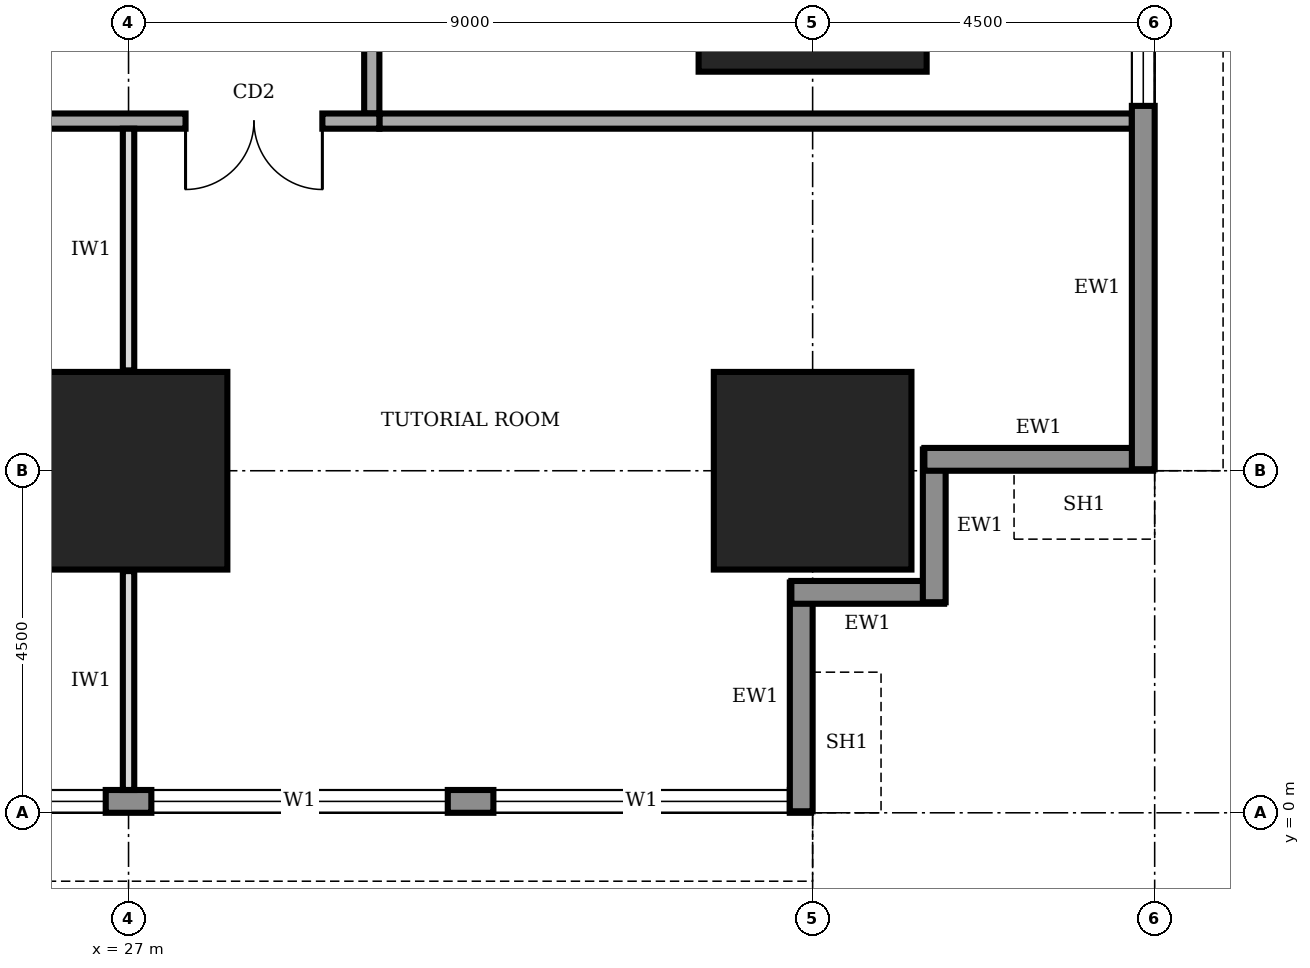
"""IFC4 building model, lengths in metres.
Left out: names, types, materials, properties, quantities, classifications, styles, units other than length and angle.
Written with IfcOpenShell. Run it as: python <this file> out.ifc"""

import sys

from ifc_helpers import new_model, si_unit, direction, frame, frame_2d, origin, origin_2d, place, context, subcontext, project, spatial, rectangle, extrude, element, fill, save


model = new_model("IFC4")
c1 = context("Model", 3, precision=1e-05, world=origin(), true_north=direction((0.0, 1.0)))
c2 = subcontext(c1, "Body", "Model", "MODEL_VIEW")
j1 = project(units=[si_unit("LENGTHUNIT", "METRE"), si_unit("PLANEANGLEUNIT", "RADIAN")], contexts=[c1])
p1 = place(None, origin())
s1 = spatial("IfcSite", under=j1, at=p1, CompositionType="ELEMENT")
p2 = place(p1, origin())
s2 = spatial("IfcBuilding", under=s1, at=p2, CompositionType="ELEMENT")
p3 = place(p2, frame((0.0, 0.0, 45.0)))
s3 = spatial("IfcBuildingStorey", under=s2, at=p3, CompositionType="ELEMENT", Elevation=45.0)
for number, where, z_axis, x_axis in (
    (1, (27.0, 4.5, 0.0), (0.0, 0.0, 1.0), (1.0, 0.0, 0.0)),
    (2, (36.0, 4.5, 0.0), (0.0, 0.0, 1.0), (1.0, 0.0, 0.0)),
):
    element("IfcColumn", number, at=place(p3, frame(where, z_axis=z_axis, x_axis=x_axis)), inside=s3, PredefinedType="COLUMN", context=c2, shape_type="SweptSolid", body=[
        extrude(rectangle(XDim=2.6, YDim=2.6, at=origin_2d()), origin(), (0.0, 0.0, 1.0), 4.0),
    ])
p4 = place(p3, frame((36.0, 11.25, 0.0), z_axis=(0.0, 0.0, 1.0), x_axis=(1.0, 0.0, 0.0)))
e3 = element("IfcColumn", 3, at=p4, inside=s3, PredefinedType="COLUMN", context=c2, shape_type="SweptSolid", body=[
    extrude(rectangle(XDim=3.0, YDim=3.0, at=origin_2d()), origin(), (0.0, 0.0, 1.0), 4.0),
])
p5 = place(p3, frame((4.52, 0.15, 0.0), z_axis=(0.0, 0.0, 1.0), x_axis=(1.0, 0.0, 0.0)))
e4 = element("IfcWall", 4, at=p5, inside=s3, PredefinedType="STANDARD", context=c2, shape_type="SweptSolid", body=[
    extrude(rectangle(XDim=31.46, YDim=0.3, at=frame_2d((15.73, 0.0))), origin(), (0.0, 0.0, 1.0), 3.75),
])
p6 = place(p5, frame((4.78, 0.0, 0.9)))
e5 = element("IfcOpeningElement", 5, at=p6, cuts=e4, PredefinedType="OPENING", context=c2, shape_type="SweptSolid", body=[
    extrude(rectangle(XDim=3.9, YDim=2.2, at=frame_2d((1.95, 1.1))), frame((0.0, 0.16, 0.0), z_axis=(0.0, -1.0, 0.0), x_axis=(1.0, 0.0, 0.0)), (0.0, 0.0, 1.0), 0.32),
])
p7 = place(p5, frame((9.28, 0.0, 0.9)))
e6 = element("IfcOpeningElement", 6, at=p7, cuts=e4, PredefinedType="OPENING", context=c2, shape_type="SweptSolid", body=[
    extrude(rectangle(XDim=3.9, YDim=2.2, at=frame_2d((1.95, 1.1))), frame((0.0, 0.16, 0.0), z_axis=(0.0, -1.0, 0.0), x_axis=(1.0, 0.0, 0.0)), (0.0, 0.0, 1.0), 0.32),
])
p8 = place(p5, frame((13.78, 0.0, 0.9)))
e7 = element("IfcOpeningElement", 7, at=p8, cuts=e4, PredefinedType="OPENING", context=c2, shape_type="SweptSolid", body=[
    extrude(rectangle(XDim=3.9, YDim=2.2, at=frame_2d((1.95, 1.1))), frame((0.0, 0.16, 0.0), z_axis=(0.0, -1.0, 0.0), x_axis=(1.0, 0.0, 0.0)), (0.0, 0.0, 1.0), 0.32),
])
p9 = place(p5, frame((18.28, 0.0, 0.9)))
e8 = element("IfcOpeningElement", 8, at=p9, cuts=e4, PredefinedType="OPENING", context=c2, shape_type="SweptSolid", body=[
    extrude(rectangle(XDim=3.9, YDim=2.2, at=frame_2d((1.95, 1.1))), frame((0.0, 0.16, 0.0), z_axis=(0.0, -1.0, 0.0), x_axis=(1.0, 0.0, 0.0)), (0.0, 0.0, 1.0), 0.32),
])
p10 = place(p5, frame((22.78, 0.0, 0.9)))
e9 = element("IfcOpeningElement", 9, at=p10, cuts=e4, PredefinedType="OPENING", context=c2, shape_type="SweptSolid", body=[
    extrude(rectangle(XDim=3.9, YDim=2.2, at=frame_2d((1.95, 1.1))), frame((0.0, 0.16, 0.0), z_axis=(0.0, -1.0, 0.0), x_axis=(1.0, 0.0, 0.0)), (0.0, 0.0, 1.0), 0.32),
])
p11 = place(p5, frame((27.28, 0.0, 0.9)))
e10 = element("IfcOpeningElement", 10, at=p11, cuts=e4, PredefinedType="OPENING", context=c2, shape_type="SweptSolid", body=[
    extrude(rectangle(XDim=3.9, YDim=2.2, at=frame_2d((1.95, 1.1))), frame((0.0, 0.16, 0.0), z_axis=(0.0, -1.0, 0.0), x_axis=(1.0, 0.0, 0.0)), (0.0, 0.0, 1.0), 0.32),
])
p12 = place(p3, frame((35.85, 0.02, 0.0), z_axis=(0.0, 0.0, 1.0), x_axis=(0.0, 1.0, 0.0)))
e11 = element("IfcWall", 11, at=p12, inside=s3, PredefinedType="STANDARD", context=c2, shape_type="SweptSolid", body=[
    extrude(rectangle(XDim=3.01, YDim=0.3, at=frame_2d((1.505, 0.0))), origin(), (0.0, 0.0, 1.0), 2.85),
])
for number, where, z_axis, x_axis in (
    (12, (35.72, 2.9, 0.0), (0.0, 0.0, 1.0), (1.0, 0.0, 0.0)),
    (13, (37.6, 2.77, 0.0), (0.0, 0.0, 1.0), (0.0, 1.0, 0.0)),
):
    element("IfcWall", number, at=place(p3, frame(where, z_axis=z_axis, x_axis=x_axis)), inside=s3, PredefinedType="STANDARD", context=c2, shape_type="SweptSolid", body=[
        extrude(rectangle(XDim=2.01, YDim=0.3, at=frame_2d((1.005, 0.0))), origin(), (0.0, 0.0, 1.0), 3.75),
    ])
p13 = place(p3, frame((37.47, 4.65, 0.0), z_axis=(0.0, 0.0, 1.0), x_axis=(1.0, 0.0, 0.0)))
e14 = element("IfcWall", 14, at=p13, inside=s3, PredefinedType="STANDARD", context=c2, shape_type="SweptSolid", body=[
    extrude(rectangle(XDim=3.01, YDim=0.3, at=frame_2d((1.505, 0.0))), origin(), (0.0, 0.0, 1.0), 2.85),
])
p14 = place(p3, frame((40.35, 4.52, 0.0), z_axis=(0.0, 0.0, 1.0), x_axis=(0.0, 1.0, 0.0)))
e15 = element("IfcWall", 15, at=p14, inside=s3, PredefinedType="STANDARD", context=c2, shape_type="SweptSolid", body=[
    extrude(rectangle(XDim=31.46, YDim=0.3, at=frame_2d((15.73, 0.0))), origin(), (0.0, 0.0, 1.0), 3.75),
])
p15 = place(p14, frame((4.78, 0.0, 0.9)))
e16 = element("IfcOpeningElement", 16, at=p15, cuts=e15, PredefinedType="OPENING", context=c2, shape_type="SweptSolid", body=[
    extrude(rectangle(XDim=3.9, YDim=2.2, at=frame_2d((1.95, 1.1))), frame((0.0, 0.16, 0.0), z_axis=(0.0, -1.0, 0.0), x_axis=(1.0, 0.0, 0.0)), (0.0, 0.0, 1.0), 0.32),
])
p16 = place(p14, frame((9.28, 0.0, 0.9)))
e17 = element("IfcOpeningElement", 17, at=p16, cuts=e15, PredefinedType="OPENING", context=c2, shape_type="SweptSolid", body=[
    extrude(rectangle(XDim=3.9, YDim=2.2, at=frame_2d((1.95, 1.1))), frame((0.0, 0.16, 0.0), z_axis=(0.0, -1.0, 0.0), x_axis=(1.0, 0.0, 0.0)), (0.0, 0.0, 1.0), 0.32),
])
p17 = place(p14, frame((13.78, 0.0, 0.9)))
e18 = element("IfcOpeningElement", 18, at=p17, cuts=e15, PredefinedType="OPENING", context=c2, shape_type="SweptSolid", body=[
    extrude(rectangle(XDim=3.9, YDim=2.2, at=frame_2d((1.95, 1.1))), frame((0.0, 0.16, 0.0), z_axis=(0.0, -1.0, 0.0), x_axis=(1.0, 0.0, 0.0)), (0.0, 0.0, 1.0), 0.32),
])
p18 = place(p14, frame((18.28, 0.0, 0.9)))
e19 = element("IfcOpeningElement", 19, at=p18, cuts=e15, PredefinedType="OPENING", context=c2, shape_type="SweptSolid", body=[
    extrude(rectangle(XDim=3.9, YDim=2.2, at=frame_2d((1.95, 1.1))), frame((0.0, 0.16, 0.0), z_axis=(0.0, -1.0, 0.0), x_axis=(1.0, 0.0, 0.0)), (0.0, 0.0, 1.0), 0.32),
])
p19 = place(p14, frame((22.78, 0.0, 0.9)))
e20 = element("IfcOpeningElement", 20, at=p19, cuts=e15, PredefinedType="OPENING", context=c2, shape_type="SweptSolid", body=[
    extrude(rectangle(XDim=3.9, YDim=2.2, at=frame_2d((1.95, 1.1))), frame((0.0, 0.16, 0.0), z_axis=(0.0, -1.0, 0.0), x_axis=(1.0, 0.0, 0.0)), (0.0, 0.0, 1.0), 0.32),
])
p20 = place(p14, frame((27.28, 0.0, 0.9)))
e21 = element("IfcOpeningElement", 21, at=p20, cuts=e15, PredefinedType="OPENING", context=c2, shape_type="SweptSolid", body=[
    extrude(rectangle(XDim=3.9, YDim=2.2, at=frame_2d((1.95, 1.1))), frame((0.0, 0.16, 0.0), z_axis=(0.0, -1.0, 0.0), x_axis=(1.0, 0.0, 0.0)), (0.0, 0.0, 1.0), 0.32),
])
p21 = place(p3, frame((11.9, 9.1, 0.0), z_axis=(0.0, 0.0, 1.0), x_axis=(1.0, 0.0, 0.0)))
e22 = element("IfcWall", 22, at=p21, inside=s3, PredefinedType="SOLIDWALL", context=c2, shape_type="SweptSolid", body=[
    extrude(rectangle(XDim=18.4, YDim=0.2, at=frame_2d((9.2, 0.0))), origin(), (0.0, 0.0, 1.0), 3.75),
])
p22 = place(p21, frame((0.275, 0.0, 0.0)))
e23 = element("IfcOpeningElement", 23, at=p22, cuts=e22, PredefinedType="OPENING", context=c2, shape_type="SweptSolid", body=[
    extrude(rectangle(XDim=1.0, YDim=2.1, at=frame_2d((0.5, 1.05))), frame((0.0, 0.11, 0.0), z_axis=(0.0, -1.0, 0.0), x_axis=(1.0, 0.0, 0.0)), (0.0, 0.0, 1.0), 0.22),
])
p23 = place(p21, frame((3.35, 0.0, 0.0)))
e24 = element("IfcOpeningElement", 24, at=p23, cuts=e22, PredefinedType="OPENING", context=c2, shape_type="SweptSolid", body=[
    extrude(rectangle(XDim=1.0, YDim=2.1, at=frame_2d((0.5, 1.05))), frame((0.0, 0.11, 0.0), z_axis=(0.0, -1.0, 0.0), x_axis=(1.0, 0.0, 0.0)), (0.0, 0.0, 1.0), 0.22),
])
p24 = place(p21, frame((10.1, 0.0, 0.0)))
e25 = element("IfcOpeningElement", 25, at=p24, cuts=e22, PredefinedType="OPENING", context=c2, shape_type="SweptSolid", body=[
    extrude(rectangle(XDim=1.0, YDim=2.1, at=frame_2d((0.5, 1.05))), frame((0.0, 0.11, 0.0), z_axis=(0.0, -1.0, 0.0), x_axis=(1.0, 0.0, 0.0)), (0.0, 0.0, 1.0), 0.22),
])
p25 = place(p21, frame((15.85, 0.0, 0.0)))
e26 = element("IfcOpeningElement", 26, at=p25, cuts=e22, PredefinedType="OPENING", context=c2, shape_type="SweptSolid", body=[
    extrude(rectangle(XDim=1.8, YDim=2.1, at=frame_2d((0.9, 1.05))), frame((0.0, 0.11, 0.0), z_axis=(0.0, -1.0, 0.0), x_axis=(1.0, 0.0, 0.0)), (0.0, 0.0, 1.0), 0.22),
])
p26 = place(p3, frame((30.2, 9.2, 0.0), z_axis=(0.0, 0.0, 1.0), x_axis=(0.0, 1.0, 0.0)))
e27 = element("IfcWall", 27, at=p26, inside=s3, PredefinedType="SOLIDWALL", context=c2, shape_type="SweptSolid", body=[
    extrude(rectangle(XDim=22.3, YDim=0.2, at=frame_2d((11.15, 0.0))), origin(), (0.0, 0.0, 1.0), 3.75),
])
p27 = place(p26, frame((1.55, 0.0, 0.0)))
e28 = element("IfcOpeningElement", 28, at=p27, cuts=e27, PredefinedType="OPENING", context=c2, shape_type="SweptSolid", body=[
    extrude(rectangle(XDim=1.0, YDim=2.1, at=frame_2d((0.5, 1.05))), frame((0.0, 0.11, 0.0), z_axis=(0.0, -1.0, 0.0), x_axis=(1.0, 0.0, 0.0)), (0.0, 0.0, 1.0), 0.22),
])
p28 = place(p26, frame((8.3, 0.0, 0.0)))
e29 = element("IfcOpeningElement", 29, at=p28, cuts=e27, PredefinedType="OPENING", context=c2, shape_type="SweptSolid", body=[
    extrude(rectangle(XDim=1.0, YDim=2.1, at=frame_2d((0.5, 1.05))), frame((0.0, 0.11, 0.0), z_axis=(0.0, -1.0, 0.0), x_axis=(1.0, 0.0, 0.0)), (0.0, 0.0, 1.0), 0.22),
])
p29 = place(p26, frame((17.3, 0.0, 0.0)))
e30 = element("IfcOpeningElement", 30, at=p29, cuts=e27, PredefinedType="OPENING", context=c2, shape_type="SweptSolid", body=[
    extrude(rectangle(XDim=1.0, YDim=2.1, at=frame_2d((0.5, 1.05))), frame((0.0, 0.11, 0.0), z_axis=(0.0, -1.0, 0.0), x_axis=(1.0, 0.0, 0.0)), (0.0, 0.0, 1.0), 0.22),
])
p30 = place(p3, frame((30.3, 9.1, 0.0), z_axis=(0.0, 0.0, 1.0), x_axis=(1.0, 0.0, 0.0)))
e31 = element("IfcWall", 31, at=p30, inside=s3, PredefinedType="SOLIDWALL", context=c2, shape_type="SweptSolid", body=[
    extrude(rectangle(XDim=9.9, YDim=0.2, at=frame_2d((4.95, 0.0))), origin(), (0.0, 0.0, 1.0), 3.75),
])
p31 = place(p3, frame((27.0, 0.3, 0.0), z_axis=(0.0, 0.0, 1.0), x_axis=(0.0, 1.0, 0.0)))
e32 = element("IfcWall", 32, at=p31, inside=s3, PredefinedType="PARTITIONING", context=c2, shape_type="SweptSolid", body=[
    extrude(rectangle(XDim=2.88, YDim=0.15, at=frame_2d((1.44, 0.0))), origin(), (0.0, 0.0, 1.0), 2.85),
])
p32 = place(p3, frame((27.0, 5.82, 0.0), z_axis=(0.0, 0.0, 1.0), x_axis=(0.0, 1.0, 0.0)))
e33 = element("IfcWall", 33, at=p32, inside=s3, PredefinedType="PARTITIONING", context=c2, shape_type="SweptSolid", body=[
    extrude(rectangle(XDim=3.18, YDim=0.15, at=frame_2d((1.59, 0.0))), origin(), (0.0, 0.0, 1.0), 2.85),
])
p33 = place(p9, origin())
e34 = element("IfcWindow", 34, at=p33, inside=s3, PartitioningType="SINGLE_PANEL", PredefinedType="WINDOW", context=c2, shape_type="SweptSolid", body=[
    extrude(rectangle(XDim=3.9, YDim=2.2, at=frame_2d((1.95, 1.1))), frame((0.0, 0.03, 0.0), z_axis=(0.0, -1.0, 0.0), x_axis=(1.0, 0.0, 0.0)), (0.0, 0.0, 1.0), 0.06),
])
fill(e8, e34)
p34 = place(p10, origin())
e35 = element("IfcWindow", 35, at=p34, inside=s3, PartitioningType="SINGLE_PANEL", PredefinedType="WINDOW", context=c2, shape_type="SweptSolid", body=[
    extrude(rectangle(XDim=3.9, YDim=2.2, at=frame_2d((1.95, 1.1))), frame((0.0, 0.03, 0.0), z_axis=(0.0, -1.0, 0.0), x_axis=(1.0, 0.0, 0.0)), (0.0, 0.0, 1.0), 0.06),
])
fill(e9, e35)
p35 = place(p11, origin())
e36 = element("IfcWindow", 36, at=p35, inside=s3, PartitioningType="SINGLE_PANEL", PredefinedType="WINDOW", context=c2, shape_type="SweptSolid", body=[
    extrude(rectangle(XDim=3.9, YDim=2.2, at=frame_2d((1.95, 1.1))), frame((0.0, 0.03, 0.0), z_axis=(0.0, -1.0, 0.0), x_axis=(1.0, 0.0, 0.0)), (0.0, 0.0, 1.0), 0.06),
])
fill(e10, e36)
p36 = place(p15, origin())
e37 = element("IfcWindow", 37, at=p36, inside=s3, PartitioningType="SINGLE_PANEL", PredefinedType="WINDOW", context=c2, shape_type="SweptSolid", body=[
    extrude(rectangle(XDim=3.9, YDim=2.2, at=frame_2d((1.95, 1.1))), frame((0.0, 0.03, 0.0), z_axis=(0.0, -1.0, 0.0), x_axis=(1.0, 0.0, 0.0)), (0.0, 0.0, 1.0), 0.06),
])
fill(e16, e37)
p37 = place(p25, frame((1.8, 0.0, 0.0), z_axis=(0.0, 0.0, 1.0), x_axis=(-1.0, 0.0, 0.0)))
e38 = element("IfcDoor", 38, at=p37, inside=s3, OperationType="DOUBLE_DOOR_SINGLE_SWING", PredefinedType="DOOR", context=c2, shape_type="SweptSolid", body=[
    extrude(rectangle(XDim=1.8, YDim=2.1, at=frame_2d((0.9, 1.05))), frame((0.0, 0.025, 0.0), z_axis=(0.0, -1.0, 0.0), x_axis=(1.0, 0.0, 0.0)), (0.0, 0.0, 1.0), 0.05),
])
fill(e26, e38)
save(model, sys.argv[1])
